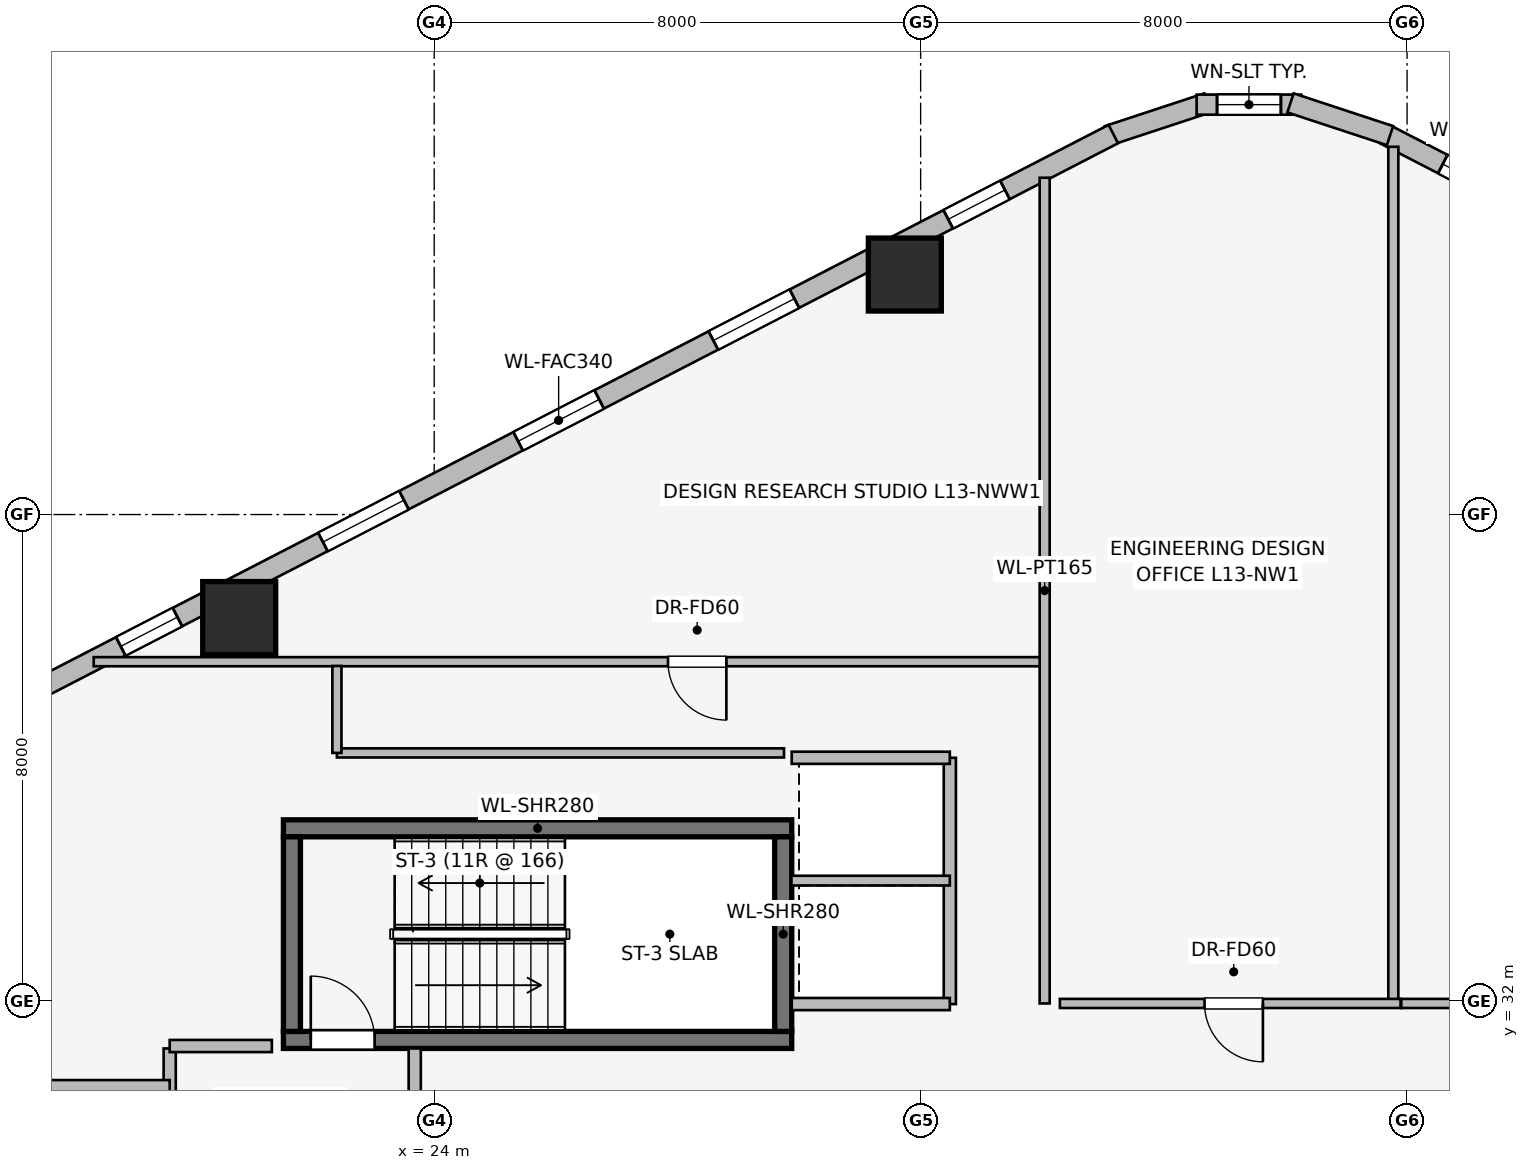
"""IFC4 building model, lengths in metres.
Left out: names, types, materials, properties, quantities, classifications, styles, units other than length and angle.
Written with IfcOpenShell. Run it as: python <this file> out.ifc"""

import sys

from ifc_helpers import new_model, si_unit, direction, frame, frame_2d, origin, origin_2d, place, context, subcontext, project, spatial, rectangle, extrude, element, fill, save


model = new_model("IFC4")
c1 = context("Model", 3, precision=1e-05, world=origin(), true_north=direction((0.0, 1.0)))
c2 = subcontext(c1, "Body", "Model", "MODEL_VIEW")
j1 = project(units=[si_unit("LENGTHUNIT", "METRE"), si_unit("PLANEANGLEUNIT", "RADIAN")], contexts=[c1])
p1 = place(None, origin())
s1 = spatial("IfcSite", under=j1, at=p1, CompositionType="ELEMENT")
p2 = place(p1, origin())
s2 = spatial("IfcBuilding", under=s1, at=p2, CompositionType="ELEMENT")
p3 = place(p2, frame((0.0, 0.0, 52.55)))
s3 = spatial("IfcBuildingStorey", under=s2, at=p3, CompositionType="ELEMENT", Elevation=52.55)
p4 = place(p3, frame((21.52, 31.36, 0.0), z_axis=(0.0, 0.0, 1.0), x_axis=(1.0, 0.0, 0.0)))
e1 = element("IfcWall", 1, at=p4, inside=s3, PredefinedType="SHEAR", context=c2, shape_type="SweptSolid", body=[
    extrude(rectangle(XDim=8.36, YDim=0.28, at=frame_2d((4.18, 0.0))), origin(), (0.0, 0.0, 1.0), 3.65),
])
p5 = place(p4, frame((0.45, 0.0, 0.0)))
e2 = element("IfcOpeningElement", 2, at=p5, cuts=e1, PredefinedType="OPENING", context=c2, shape_type="SweptSolid", body=[
    extrude(rectangle(XDim=1.05, YDim=2.0, at=frame_2d((0.525, 1.0))), frame((0.0, 0.15, 0.0), z_axis=(0.0, -1.0, 0.0), x_axis=(1.0, 0.0, 0.0)), (0.0, 0.0, 1.0), 0.3),
])
p6 = place(p3, frame((29.88, 34.84, 0.0), z_axis=(0.0, 0.0, 1.0), x_axis=(-1.0, 0.0, 0.0)))
e3 = element("IfcWall", 3, at=p6, inside=s3, PredefinedType="SHEAR", context=c2, shape_type="SweptSolid", body=[
    extrude(rectangle(XDim=8.36, YDim=0.28, at=frame_2d((4.18, 0.0))), origin(), (0.0, 0.0, 1.0), 3.65),
])
for number, where, z_axis, x_axis in (
    (4, (21.66, 34.7, 0.0), (0.0, 0.0, 1.0), (0.0, -1.0, 0.0)),
    (5, (29.74, 31.5, 0.0), (0.0, 0.0, 1.0), (0.0, 1.0, 0.0)),
):
    element("IfcWall", number, at=place(p3, frame(where, z_axis=z_axis, x_axis=x_axis)), inside=s3, PredefinedType="SHEAR", context=c2, shape_type="SweptSolid", body=[
        extrude(rectangle(XDim=3.2, YDim=0.28, at=frame_2d((1.6, 0.0))), origin(), (0.0, 0.0, 1.0), 3.65),
    ])
for number, where, z_axis, x_axis in (
    (6, (31.74, 43.947, 0.0), (0.0, 0.0, 1.0), (1.0, 0.0, 0.0)),
    (7, (20.793, 38.298, 0.0), (0.0, 0.0, 1.0), (1.0, 0.0, 0.0)),
):
    element("IfcColumn", number, at=place(p3, frame(where, z_axis=z_axis, x_axis=x_axis)), inside=s3, PredefinedType="COLUMN", context=c2, shape_type="SweptSolid", body=[
        extrude(rectangle(XDim=1.2, YDim=1.2, at=origin_2d()), origin(), (0.0, 0.0, 1.0), 3.65),
    ])
p7 = place(p3, frame((39.631, 46.257, 0.0), z_axis=(0.0, 0.0, 1.0), x_axis=(0.888634413993, -0.458616264721, 0.0)))
e8 = element("IfcWall", 8, at=p7, inside=s3, PredefinedType="STANDARD", context=c2, shape_type="SweptSolid", body=[
    extrude(rectangle(XDim=20.531, YDim=0.34, at=frame_2d((10.266, 0.0))), origin(), (0.0, 0.0, 1.0), 2.654),
])
p8 = place(p7, frame((1.076, 0.0, 0.75)))
e9 = element("IfcOpeningElement", 9, at=p8, cuts=e8, PredefinedType="OPENING", context=c2, shape_type="SweptSolid", body=[
    extrude(rectangle(XDim=1.8, YDim=1.5, at=frame_2d((0.9, 0.75))), frame((0.0, 0.18, 0.0), z_axis=(0.0, -1.0, 0.0), x_axis=(1.0, 0.0, 0.0)), (0.0, 0.0, 1.0), 0.36),
])
p9 = place(p7, frame((6.122, 0.0, 0.75)))
e10 = element("IfcOpeningElement", 10, at=p9, cuts=e8, PredefinedType="OPENING", context=c2, shape_type="SweptSolid", body=[
    extrude(rectangle(XDim=1.5, YDim=1.5, at=frame_2d((0.75, 0.75))), frame((0.0, 0.18, 0.0), z_axis=(0.0, -1.0, 0.0), x_axis=(1.0, 0.0, 0.0)), (0.0, 0.0, 1.0), 0.36),
])
p10 = place(p7, frame((8.211, 0.0, 0.75)))
e11 = element("IfcOpeningElement", 11, at=p10, cuts=e8, PredefinedType="OPENING", context=c2, shape_type="SweptSolid", body=[
    extrude(rectangle(XDim=1.5, YDim=1.5, at=frame_2d((0.75, 0.75))), frame((0.0, 0.18, 0.0), z_axis=(0.0, -1.0, 0.0), x_axis=(1.0, 0.0, 0.0)), (0.0, 0.0, 1.0), 0.36),
])
p11 = place(p7, frame((10.299, 0.0, 0.75)))
e12 = element("IfcOpeningElement", 12, at=p11, cuts=e8, PredefinedType="OPENING", context=c2, shape_type="SweptSolid", body=[
    extrude(rectangle(XDim=1.5, YDim=1.5, at=frame_2d((0.75, 0.75))), frame((0.0, 0.18, 0.0), z_axis=(0.0, -1.0, 0.0), x_axis=(1.0, 0.0, 0.0)), (0.0, 0.0, 1.0), 0.36),
])
p12 = place(p7, frame((13.352, 0.0, 0.75)))
e13 = element("IfcOpeningElement", 13, at=p12, cuts=e8, PredefinedType="OPENING", context=c2, shape_type="SweptSolid", body=[
    extrude(rectangle(XDim=1.8, YDim=1.5, at=frame_2d((0.9, 0.75))), frame((0.0, 0.18, 0.0), z_axis=(0.0, -1.0, 0.0), x_axis=(1.0, 0.0, 0.0)), (0.0, 0.0, 1.0), 0.36),
])
p13 = place(p7, frame((18.272, 0.0, 0.75)))
e14 = element("IfcOpeningElement", 14, at=p13, cuts=e8, PredefinedType="OPENING", context=c2, shape_type="SweptSolid", body=[
    extrude(rectangle(XDim=1.5, YDim=1.5, at=frame_2d((0.75, 0.75))), frame((0.0, 0.18, 0.0), z_axis=(0.0, -1.0, 0.0), x_axis=(1.0, 0.0, 0.0)), (0.0, 0.0, 1.0), 0.36),
])
p14 = place(p3, frame((35.081, 46.231, 0.0), z_axis=(0.0, 0.0, 1.0), x_axis=(0.94976901097, 0.312951794691, 0.0)))
e15 = element("IfcWall", 15, at=p14, inside=s3, PredefinedType="STANDARD", context=c2, shape_type="SweptSolid", body=[
    extrude(rectangle(XDim=1.722, YDim=0.33, at=frame_2d((0.861, 0.0))), origin(), (0.0, 0.0, 1.0), 3.36),
])
p15 = place(p3, frame((36.539, 46.741, 0.0), z_axis=(0.0, 0.0, 1.0), x_axis=(1.0, 0.0, 0.0)))
e16 = element("IfcWall", 16, at=p15, inside=s3, PredefinedType="STANDARD", context=c2, shape_type="SweptSolid", body=[
    extrude(rectangle(XDim=1.722, YDim=0.33, at=frame_2d((0.861, 0.0))), origin(), (0.0, 0.0, 1.0), 3.36),
])
p16 = place(p15, frame((0.336, 0.0, 0.75)))
e17 = element("IfcOpeningElement", 17, at=p16, cuts=e16, PredefinedType="OPENING", context=c2, shape_type="SweptSolid", body=[
    extrude(rectangle(XDim=1.05, YDim=1.4, at=frame_2d((0.525, 0.7))), frame((0.0, 0.175, 0.0), z_axis=(0.0, -1.0, 0.0), x_axis=(1.0, 0.0, 0.0)), (0.0, 0.0, 1.0), 0.35),
])
p17 = place(p3, frame((38.083, 46.77, 0.0), z_axis=(0.0, 0.0, 1.0), x_axis=(0.94976901097, -0.312951794691, 0.0)))
e18 = element("IfcWall", 18, at=p17, inside=s3, PredefinedType="STANDARD", context=c2, shape_type="SweptSolid", body=[
    extrude(rectangle(XDim=1.722, YDim=0.33, at=frame_2d((0.861, 0.0))), origin(), (0.0, 0.0, 1.0), 3.36),
])
p18 = place(p3, frame((16.924, 36.841, 0.0), z_axis=(0.0, 0.0, 1.0), x_axis=(0.888634413993, 0.458616264721, 0.0)))
e19 = element("IfcWall", 19, at=p18, inside=s3, PredefinedType="STANDARD", context=c2, shape_type="SweptSolid", body=[
    extrude(rectangle(XDim=20.531, YDim=0.34, at=frame_2d((10.266, 0.0))), origin(), (0.0, 0.0, 1.0), 2.654),
])
p19 = place(p18, frame((2.161, 0.0, 0.75)))
e20 = element("IfcOpeningElement", 20, at=p19, cuts=e19, PredefinedType="OPENING", context=c2, shape_type="SweptSolid", body=[
    extrude(rectangle(XDim=1.05, YDim=1.4, at=frame_2d((0.525, 0.7))), frame((0.0, 0.18, 0.0), z_axis=(0.0, -1.0, 0.0), x_axis=(1.0, 0.0, 0.0)), (0.0, 0.0, 1.0), 0.36),
])
p20 = place(p18, frame((5.903, 0.0, 0.75)))
e21 = element("IfcOpeningElement", 21, at=p20, cuts=e19, PredefinedType="OPENING", context=c2, shape_type="SweptSolid", body=[
    extrude(rectangle(XDim=1.5, YDim=1.5, at=frame_2d((0.75, 0.75))), frame((0.0, 0.18, 0.0), z_axis=(0.0, -1.0, 0.0), x_axis=(1.0, 0.0, 0.0)), (0.0, 0.0, 1.0), 0.36),
])
p21 = place(p18, frame((9.516, 0.0, 0.75)))
e22 = element("IfcOpeningElement", 22, at=p21, cuts=e19, PredefinedType="OPENING", context=c2, shape_type="SweptSolid", body=[
    extrude(rectangle(XDim=1.5, YDim=1.5, at=frame_2d((0.75, 0.75))), frame((0.0, 0.18, 0.0), z_axis=(0.0, -1.0, 0.0), x_axis=(1.0, 0.0, 0.0)), (0.0, 0.0, 1.0), 0.36),
])
p22 = place(p18, frame((13.129, 0.0, 0.75)))
e23 = element("IfcOpeningElement", 23, at=p22, cuts=e19, PredefinedType="OPENING", context=c2, shape_type="SweptSolid", body=[
    extrude(rectangle(XDim=1.5, YDim=1.5, at=frame_2d((0.75, 0.75))), frame((0.0, 0.18, 0.0), z_axis=(0.0, -1.0, 0.0), x_axis=(1.0, 0.0, 0.0)), (0.0, 0.0, 1.0), 0.36),
])
p23 = place(p18, frame((17.476, 0.0, 0.75)))
e24 = element("IfcOpeningElement", 24, at=p23, cuts=e19, PredefinedType="OPENING", context=c2, shape_type="SweptSolid", body=[
    extrude(rectangle(XDim=1.05, YDim=1.4, at=frame_2d((0.525, 0.7))), frame((0.0, 0.18, 0.0), z_axis=(0.0, -1.0, 0.0), x_axis=(1.0, 0.0, 0.0)), (0.0, 0.0, 1.0), 0.36),
])
p24 = place(p3, frame((19.65, 25.68, 0.0), z_axis=(0.0, 0.0, 1.0), x_axis=(0.0, 1.0, 0.0)))
e25 = element("IfcWall", 25, at=p24, inside=s3, PredefinedType="PARTITIONING", context=c2, shape_type="SweptSolid", body=[
    extrude(rectangle(XDim=5.54, YDim=0.2, at=frame_2d((2.77, 0.0))), origin(), (0.0, 0.0, 1.0), 3.36),
])
p25 = place(p24, frame((0.62, 0.0, 0.0)))
e26 = element("IfcOpeningElement", 26, at=p25, cuts=e25, PredefinedType="OPENING", context=c2, shape_type="SweptSolid", body=[
    extrude(rectangle(XDim=1.1, YDim=2.2, at=frame_2d((0.55, 1.1))), frame((0.0, 0.11, 0.0), z_axis=(0.0, -1.0, 0.0), x_axis=(1.0, 0.0, 0.0)), (0.0, 0.0, 1.0), 0.22),
])
p26 = place(p24, frame((3.12, 0.0, 0.0)))
e27 = element("IfcOpeningElement", 27, at=p26, cuts=e25, PredefinedType="OPENING", context=c2, shape_type="SweptSolid", body=[
    extrude(rectangle(XDim=1.1, YDim=2.2, at=frame_2d((0.55, 1.1))), frame((0.0, 0.11, 0.0), z_axis=(0.0, -1.0, 0.0), x_axis=(1.0, 0.0, 0.0)), (0.0, 0.0, 1.0), 0.22),
])
p27 = place(p3, frame((23.68, 25.68, 0.0), z_axis=(0.0, 0.0, 1.0), x_axis=(0.0, 1.0, 0.0)))
e28 = element("IfcWall", 28, at=p27, inside=s3, PredefinedType="PARTITIONING", context=c2, shape_type="SweptSolid", body=[
    extrude(rectangle(XDim=5.54, YDim=0.2, at=frame_2d((2.77, 0.0))), origin(), (0.0, 0.0, 1.0), 3.36),
])
p28 = place(p27, frame((1.8, 0.0, 0.0)))
e29 = element("IfcOpeningElement", 29, at=p28, cuts=e28, PredefinedType="OPENING", context=c2, shape_type="SweptSolid", body=[
    extrude(rectangle(XDim=1.05, YDim=2.0, at=frame_2d((0.525, 1.0))), frame((0.0, 0.11, 0.0), z_axis=(0.0, -1.0, 0.0), x_axis=(1.0, 0.0, 0.0)), (0.0, 0.0, 1.0), 0.22),
])
p29 = place(p3, frame((21.33, 31.26, 0.0), z_axis=(0.0, 0.0, 1.0), x_axis=(-1.0, 0.0, 0.0)))
e30 = element("IfcWall", 30, at=p29, inside=s3, PredefinedType="PARTITIONING", context=c2, shape_type="SweptSolid", body=[
    extrude(rectangle(XDim=1.68, YDim=0.2, at=frame_2d((0.84, 0.0))), origin(), (0.0, 0.0, 1.0), 3.36),
])
p30 = place(p3, frame((19.65, 30.6, 0.0), z_axis=(0.0, 0.0, 1.0), x_axis=(-1.0, 0.0, 0.0)))
e31 = element("IfcWall", 31, at=p30, inside=s3, PredefinedType="PARTITIONING", context=c2, shape_type="SweptSolid", body=[
    extrude(rectangle(XDim=2.5, YDim=0.2, at=frame_2d((1.25, 0.0))), origin(), (0.0, 0.0, 1.0), 2.26),
])
p31 = place(p3, frame((32.48, 31.95, 0.0), z_axis=(0.0, 0.0, 1.0), x_axis=(0.0, 1.0, 0.0)))
e32 = element("IfcWall", 32, at=p31, inside=s3, PredefinedType="PARTITIONING", context=c2, shape_type="SweptSolid", body=[
    extrude(rectangle(XDim=4.05, YDim=0.2, at=frame_2d((2.025, 0.0))), origin(), (0.0, 0.0, 1.0), 2.483),
])
for number, where, z_axis, x_axis in (
    (33, (29.88, 36.0, 0.0), (0.0, 0.0, 1.0), (1.0, 0.0, 0.0)),
    (34, (32.48, 31.95, 0.0), (0.0, 0.0, 1.0), (-1.0, 0.0, 0.0)),
):
    element("IfcWall", number, at=place(p3, frame(where, z_axis=z_axis, x_axis=x_axis)), inside=s3, PredefinedType="PARTITIONING", context=c2, shape_type="SweptSolid", body=[
        extrude(rectangle(XDim=2.6, YDim=0.2, at=frame_2d((1.3, 0.0))), origin(), (0.0, 0.0, 1.0), 3.36),
    ])
p32 = place(p3, frame((29.875, 33.98, 0.0), z_axis=(0.0, 0.0, 1.0), x_axis=(1.0, 0.0, 0.0)))
e35 = element("IfcWall", 35, at=p32, inside=s3, PredefinedType="PARTITIONING", context=c2, shape_type="SweptSolid", body=[
    extrude(rectangle(XDim=2.605, YDim=0.16, at=frame_2d((1.302, 0.0))), origin(), (0.0, 0.0, 1.0), 3.36),
])
p33 = place(p3, frame((34.0, 37.58, 0.0), z_axis=(0.0, 0.0, 1.0), x_axis=(-1.0, 0.0, 0.0)))
e36 = element("IfcWall", 36, at=p33, inside=s3, PredefinedType="PARTITIONING", context=c2, shape_type="SweptSolid", body=[
    extrude(rectangle(XDim=15.6, YDim=0.15, at=frame_2d((7.8, 0.0))), origin(), (0.0, 0.0, 1.0), 3.36),
])
p34 = place(p33, frame((5.195, 0.0, 0.0)))
e37 = element("IfcOpeningElement", 37, at=p34, cuts=e36, PredefinedType="OPENING", context=c2, shape_type="SweptSolid", body=[
    extrude(rectangle(XDim=0.96, YDim=2.0, at=frame_2d((0.48, 1.0))), frame((0.0, 0.085, 0.0), z_axis=(0.0, -1.0, 0.0), x_axis=(1.0, 0.0, 0.0)), (0.0, 0.0, 1.0), 0.17),
])
p35 = place(p3, frame((34.04, 31.96, 0.0), z_axis=(0.0, 0.0, 1.0), x_axis=(0.0, 1.0, 0.0)))
e38 = element("IfcWall", 38, at=p35, inside=s3, PredefinedType="PARTITIONING", context=c2, shape_type="SweptSolid", body=[
    extrude(rectangle(XDim=13.579, YDim=0.165, at=frame_2d((6.79, 0.0))), origin(), (0.0, 0.0, 1.0), 3.36),
])
p36 = place(p3, frame((39.774, 31.97, 0.0), z_axis=(0.0, 0.0, 1.0), x_axis=(0.0, 1.0, 0.0)))
e39 = element("IfcWall", 39, at=p36, inside=s3, PredefinedType="PARTITIONING", context=c2, shape_type="SweptSolid", body=[
    extrude(rectangle(XDim=14.078, YDim=0.165, at=frame_2d((7.039, 0.0))), origin(), (0.0, 0.0, 1.0), 2.483),
])
p37 = place(p3, frame((39.894, 31.96, 0.0), z_axis=(0.0, 0.0, 1.0), x_axis=(-1.0, 0.0, 0.0)))
e40 = element("IfcWall", 40, at=p37, inside=s3, PredefinedType="PARTITIONING", context=c2, shape_type="SweptSolid", body=[
    extrude(rectangle(XDim=5.604, YDim=0.15, at=frame_2d((2.802, 0.0))), origin(), (0.0, 0.0, 1.0), 3.36),
])
p38 = place(p37, frame((2.265, 0.0, 0.0)))
e41 = element("IfcOpeningElement", 41, at=p38, cuts=e40, PredefinedType="OPENING", context=c2, shape_type="SweptSolid", body=[
    extrude(rectangle(XDim=0.96, YDim=2.0, at=frame_2d((0.48, 1.0))), frame((0.0, 0.085, 0.0), z_axis=(0.0, -1.0, 0.0), x_axis=(1.0, 0.0, 0.0)), (0.0, 0.0, 1.0), 0.17),
])
p39 = place(p3, frame((44.417, 31.96, 0.0), z_axis=(0.0, 0.0, 1.0), x_axis=(-1.0, 0.0, 0.0)))
e42 = element("IfcWall", 42, at=p39, inside=s3, PredefinedType="PARTITIONING", context=c2, shape_type="SweptSolid", body=[
    extrude(rectangle(XDim=4.513, YDim=0.15, at=frame_2d((2.256, 0.0))), origin(), (0.0, 0.0, 1.0), 3.36),
])
p40 = place(p39, frame((1.834, 0.0, 0.0)))
e43 = element("IfcOpeningElement", 43, at=p40, cuts=e42, PredefinedType="OPENING", context=c2, shape_type="SweptSolid", body=[
    extrude(rectangle(XDim=0.96, YDim=2.0, at=frame_2d((0.48, 1.0))), frame((0.0, 0.085, 0.0), z_axis=(0.0, -1.0, 0.0), x_axis=(1.0, 0.0, 0.0)), (0.0, 0.0, 1.0), 0.17),
])
p41 = place(p3, frame((29.753, 36.08, 0.0), z_axis=(0.0, 0.0, 1.0), x_axis=(-1.0, 0.0, 0.0)))
e44 = element("IfcWall", 44, at=p41, inside=s3, PredefinedType="PARTITIONING", context=c2, shape_type="SweptSolid", body=[
    extrude(rectangle(XDim=7.353, YDim=0.15, at=frame_2d((3.677, 0.0))), origin(), (0.0, 0.0, 1.0), 3.36),
])
p42 = place(p3, frame((22.4, 36.08, 0.0), z_axis=(0.0, 0.0, 1.0), x_axis=(0.0, 1.0, 0.0)))
e45 = element("IfcWall", 45, at=p42, inside=s3, PredefinedType="PARTITIONING", context=c2, shape_type="SweptSolid", body=[
    extrude(rectangle(XDim=1.43, YDim=0.15, at=frame_2d((0.715, 0.0))), origin(), (0.0, 0.0, 1.0), 3.36),
])
p43 = place(p8, origin())
e46 = element("IfcWindow", 46, at=p43, inside=s3, PartitioningType="SINGLE_PANEL", PredefinedType="WINDOW", context=c2, shape_type="SweptSolid", body=[
    extrude(rectangle(XDim=1.8, YDim=1.5, at=frame_2d((0.9, 0.75))), frame((0.0, 0.03, 0.0), z_axis=(0.0, -1.0, 0.0), x_axis=(1.0, 0.0, 0.0)), (0.0, 0.0, 1.0), 0.06),
])
fill(e9, e46)
p44 = place(p16, origin())
e47 = element("IfcWindow", 47, at=p44, inside=s3, PartitioningType="SINGLE_PANEL", PredefinedType="WINDOW", context=c2, shape_type="SweptSolid", body=[
    extrude(rectangle(XDim=1.05, YDim=1.4, at=frame_2d((0.525, 0.7))), frame((0.0, 0.03, 0.0), z_axis=(0.0, -1.0, 0.0), x_axis=(1.0, 0.0, 0.0)), (0.0, 0.0, 1.0), 0.06),
])
fill(e17, e47)
p45 = place(p19, origin())
e48 = element("IfcWindow", 48, at=p45, inside=s3, PartitioningType="SINGLE_PANEL", PredefinedType="WINDOW", context=c2, shape_type="SweptSolid", body=[
    extrude(rectangle(XDim=1.05, YDim=1.4, at=frame_2d((0.525, 0.7))), frame((0.0, 0.03, 0.0), z_axis=(0.0, -1.0, 0.0), x_axis=(1.0, 0.0, 0.0)), (0.0, 0.0, 1.0), 0.06),
])
fill(e20, e48)
p46 = place(p20, origin())
e49 = element("IfcWindow", 49, at=p46, inside=s3, PartitioningType="SINGLE_PANEL", PredefinedType="WINDOW", context=c2, shape_type="SweptSolid", body=[
    extrude(rectangle(XDim=1.5, YDim=1.5, at=frame_2d((0.75, 0.75))), frame((0.0, 0.03, 0.0), z_axis=(0.0, -1.0, 0.0), x_axis=(1.0, 0.0, 0.0)), (0.0, 0.0, 1.0), 0.06),
])
fill(e21, e49)
p47 = place(p21, origin())
e50 = element("IfcWindow", 50, at=p47, inside=s3, PartitioningType="SINGLE_PANEL", PredefinedType="WINDOW", context=c2, shape_type="SweptSolid", body=[
    extrude(rectangle(XDim=1.5, YDim=1.5, at=frame_2d((0.75, 0.75))), frame((0.0, 0.03, 0.0), z_axis=(0.0, -1.0, 0.0), x_axis=(1.0, 0.0, 0.0)), (0.0, 0.0, 1.0), 0.06),
])
fill(e22, e50)
p48 = place(p22, origin())
e51 = element("IfcWindow", 51, at=p48, inside=s3, PartitioningType="SINGLE_PANEL", PredefinedType="WINDOW", context=c2, shape_type="SweptSolid", body=[
    extrude(rectangle(XDim=1.5, YDim=1.5, at=frame_2d((0.75, 0.75))), frame((0.0, 0.03, 0.0), z_axis=(0.0, -1.0, 0.0), x_axis=(1.0, 0.0, 0.0)), (0.0, 0.0, 1.0), 0.06),
])
fill(e23, e51)
p49 = place(p23, origin())
e52 = element("IfcWindow", 52, at=p49, inside=s3, PartitioningType="SINGLE_PANEL", PredefinedType="WINDOW", context=c2, shape_type="SweptSolid", body=[
    extrude(rectangle(XDim=1.05, YDim=1.4, at=frame_2d((0.525, 0.7))), frame((0.0, 0.03, 0.0), z_axis=(0.0, -1.0, 0.0), x_axis=(1.0, 0.0, 0.0)), (0.0, 0.0, 1.0), 0.06),
])
fill(e24, e52)
p50 = place(p5, origin())
e53 = element("IfcDoor", 53, at=p50, inside=s3, OperationType="SINGLE_SWING_LEFT", PredefinedType="DOOR", context=c2, shape_type="SweptSolid", body=[
    extrude(rectangle(XDim=1.05, YDim=2.0, at=frame_2d((0.525, 1.0))), frame((0.0, 0.025, 0.0), z_axis=(0.0, -1.0, 0.0), x_axis=(1.0, 0.0, 0.0)), (0.0, 0.0, 1.0), 0.05),
])
fill(e2, e53)
p51 = place(p34, origin())
e54 = element("IfcDoor", 54, at=p51, inside=s3, OperationType="SINGLE_SWING_LEFT", PredefinedType="DOOR", context=c2, shape_type="SweptSolid", body=[
    extrude(rectangle(XDim=0.96, YDim=2.0, at=frame_2d((0.48, 1.0))), frame((0.0, 0.025, 0.0), z_axis=(0.0, -1.0, 0.0), x_axis=(1.0, 0.0, 0.0)), (0.0, 0.0, 1.0), 0.05),
])
fill(e37, e54)
p52 = place(p38, origin())
e55 = element("IfcDoor", 55, at=p52, inside=s3, OperationType="SINGLE_SWING_LEFT", PredefinedType="DOOR", context=c2, shape_type="SweptSolid", body=[
    extrude(rectangle(XDim=0.96, YDim=2.0, at=frame_2d((0.48, 1.0))), frame((0.0, 0.025, 0.0), z_axis=(0.0, -1.0, 0.0), x_axis=(1.0, 0.0, 0.0)), (0.0, 0.0, 1.0), 0.05),
])
fill(e41, e55)
save(model, sys.argv[1])
